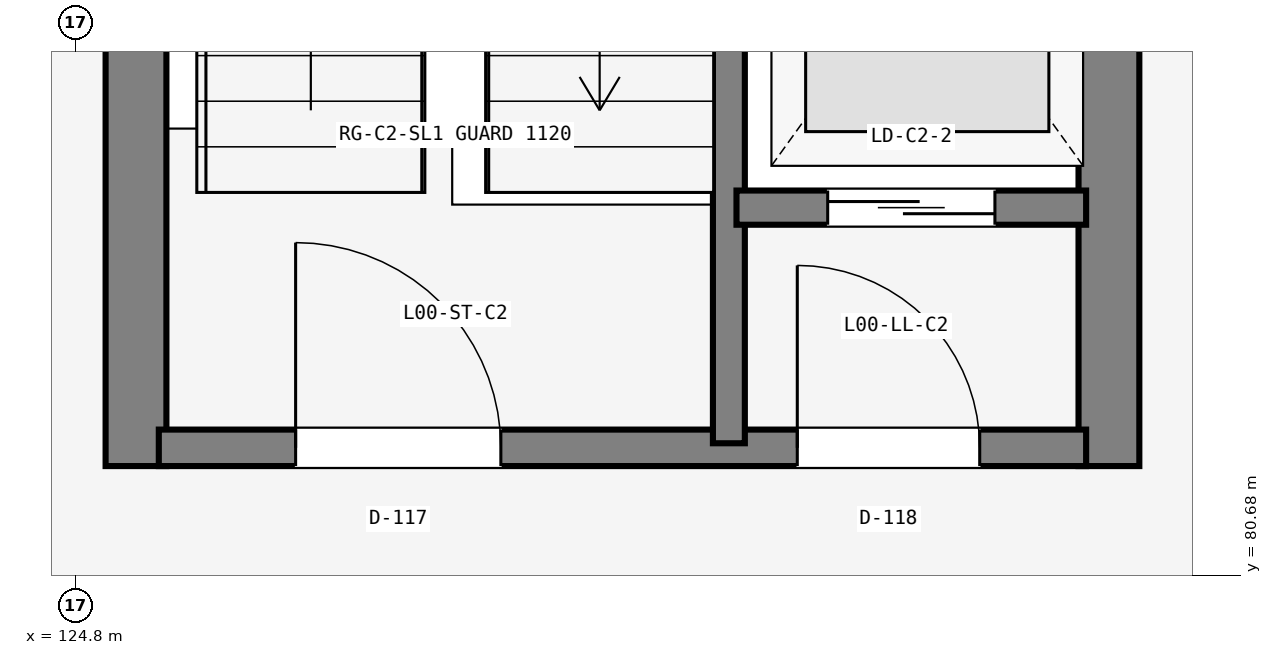
"""IFC4 building model, lengths in metres.
Left out: names, types, materials, properties, quantities, classifications, styles, units other than length and angle.
Written with IfcOpenShell. Run it as: python <this file> out.ifc"""

import sys

from ifc_helpers import new_model, si_unit, direction, frame, frame_2d, origin, place, context, subcontext, project, spatial, rectangle, extrude, element, fill, save


model = new_model("IFC4")
c1 = context("Model", 3, precision=1e-05, world=origin(), true_north=direction((0.0, 1.0)))
c2 = subcontext(c1, "Body", "Model", "MODEL_VIEW")
j1 = project(units=[si_unit("LENGTHUNIT", "METRE"), si_unit("PLANEANGLEUNIT", "RADIAN")], contexts=[c1])
p1 = place(None, origin())
s1 = spatial("IfcSite", under=j1, at=p1, CompositionType="ELEMENT")
p2 = place(p1, origin())
s2 = spatial("IfcBuilding", under=s1, at=p2, CompositionType="ELEMENT")
p3 = place(p2, origin())
s3 = spatial("IfcBuildingStorey", under=s2, at=p3, CompositionType="ELEMENT", Elevation=0.0)
for number, where, z_axis, x_axis in (
    (1, (125.2, 81.4, 0.0), (0.0, 0.0, 1.0), (0.0, 1.0, 0.0)),
    (2, (131.6, 81.4, 0.0), (0.0, 0.0, 1.0), (0.0, 1.0, 0.0)),
):
    element("IfcWall", number, at=place(p3, frame(where, z_axis=z_axis, x_axis=x_axis)), inside=s3, PredefinedType="SHEAR", context=c2, shape_type="SweptSolid", body=[
        extrude(rectangle(XDim=8.6, YDim=0.4, at=frame_2d((4.3, 0.0))), origin(), (0.0, 0.0, 1.0), 5.4),
    ])
p4 = place(p3, frame((125.35, 81.52, 0.0), z_axis=(0.0, 0.0, 1.0), x_axis=(1.0, 0.0, 0.0)))
e3 = element("IfcWall", 3, at=p4, inside=s3, PredefinedType="PARTITIONING", context=c2, shape_type="SweptSolid", body=[
    extrude(rectangle(XDim=6.1, YDim=0.24, at=frame_2d((3.05, 0.0))), origin(), (0.0, 0.0, 1.0), 4.46),
])
p5 = place(p4, frame((0.9, 0.0, 0.0)))
e4 = element("IfcOpeningElement", 4, at=p5, cuts=e3, PredefinedType="OPENING", context=c2, shape_type="SweptSolid", body=[
    extrude(rectangle(XDim=1.35, YDim=2.2, at=frame_2d((0.675, 1.1))), frame((0.0, 0.13, 0.0), z_axis=(0.0, -1.0, 0.0), x_axis=(1.0, 0.0, 0.0)), (0.0, 0.0, 1.0), 0.26),
])
p6 = place(p4, frame((4.2, 0.0, 0.0)))
e5 = element("IfcOpeningElement", 5, at=p6, cuts=e3, PredefinedType="OPENING", context=c2, shape_type="SweptSolid", body=[
    extrude(rectangle(XDim=1.2, YDim=2.2, at=frame_2d((0.6, 1.1))), frame((0.0, 0.13, 0.0), z_axis=(0.0, -1.0, 0.0), x_axis=(1.0, 0.0, 0.0)), (0.0, 0.0, 1.0), 0.26),
])
p7 = place(p3, frame((129.1, 81.55, 0.0), z_axis=(0.0, 0.0, 1.0), x_axis=(0.0, 1.0, 0.0)))
e6 = element("IfcWall", 6, at=p7, inside=s3, PredefinedType="PARTITIONING", context=c2, shape_type="SweptSolid", body=[
    extrude(rectangle(XDim=8.3, YDim=0.21, at=frame_2d((4.15, 0.0))), origin(), (0.0, 0.0, 1.0), 4.46),
])
p8 = place(p3, frame((129.15, 83.1, 0.0), z_axis=(0.0, 0.0, 1.0), x_axis=(1.0, 0.0, 0.0)))
e7 = element("IfcWall", 7, at=p8, inside=s3, PredefinedType="PARTITIONING", context=c2, shape_type="SweptSolid", body=[
    extrude(rectangle(XDim=2.3, YDim=0.225, at=frame_2d((1.15, 0.0))), origin(), (0.0, 0.0, 1.0), 4.46),
])
p9 = place(p8, frame((0.6, 0.0, 0.0)))
e8 = element("IfcOpeningElement", 8, at=p9, cuts=e7, PredefinedType="OPENING", context=c2, shape_type="SweptSolid", body=[
    extrude(rectangle(XDim=1.1, YDim=2.15, at=frame_2d((0.55, 1.075))), frame((0.0, 0.123, 0.0), z_axis=(0.0, -1.0, 0.0), x_axis=(1.0, 0.0, 0.0)), (0.0, 0.0, 1.0), 0.245),
])
p10 = place(p5, origin())
e9 = element("IfcDoor", 9, at=p10, inside=s3, OperationType="SINGLE_SWING_RIGHT", PredefinedType="DOOR", context=c2, shape_type="SweptSolid", body=[
    extrude(rectangle(XDim=1.35, YDim=2.2, at=frame_2d((0.675, 1.1))), frame((0.0, 0.025, 0.0), z_axis=(0.0, -1.0, 0.0), x_axis=(1.0, 0.0, 0.0)), (0.0, 0.0, 1.0), 0.05),
])
fill(e4, e9)
p11 = place(p6, origin())
e10 = element("IfcDoor", 10, at=p11, inside=s3, OperationType="SINGLE_SWING_LEFT", PredefinedType="DOOR", context=c2, shape_type="SweptSolid", body=[
    extrude(rectangle(XDim=1.2, YDim=2.2, at=frame_2d((0.6, 1.1))), frame((0.0, 0.025, 0.0), z_axis=(0.0, -1.0, 0.0), x_axis=(1.0, 0.0, 0.0)), (0.0, 0.0, 1.0), 0.05),
])
fill(e5, e10)
p12 = place(p9, origin())
e11 = element("IfcDoor", 11, at=p12, inside=s3, OperationType="SLIDING_TO_RIGHT", PredefinedType="DOOR", context=c2, shape_type="SweptSolid", body=[
    extrude(rectangle(XDim=1.1, YDim=2.15, at=frame_2d((0.55, 1.075))), frame((0.0, 0.025, 0.0), z_axis=(0.0, -1.0, 0.0), x_axis=(1.0, 0.0, 0.0)), (0.0, 0.0, 1.0), 0.05),
])
fill(e8, e11)
save(model, sys.argv[1])
